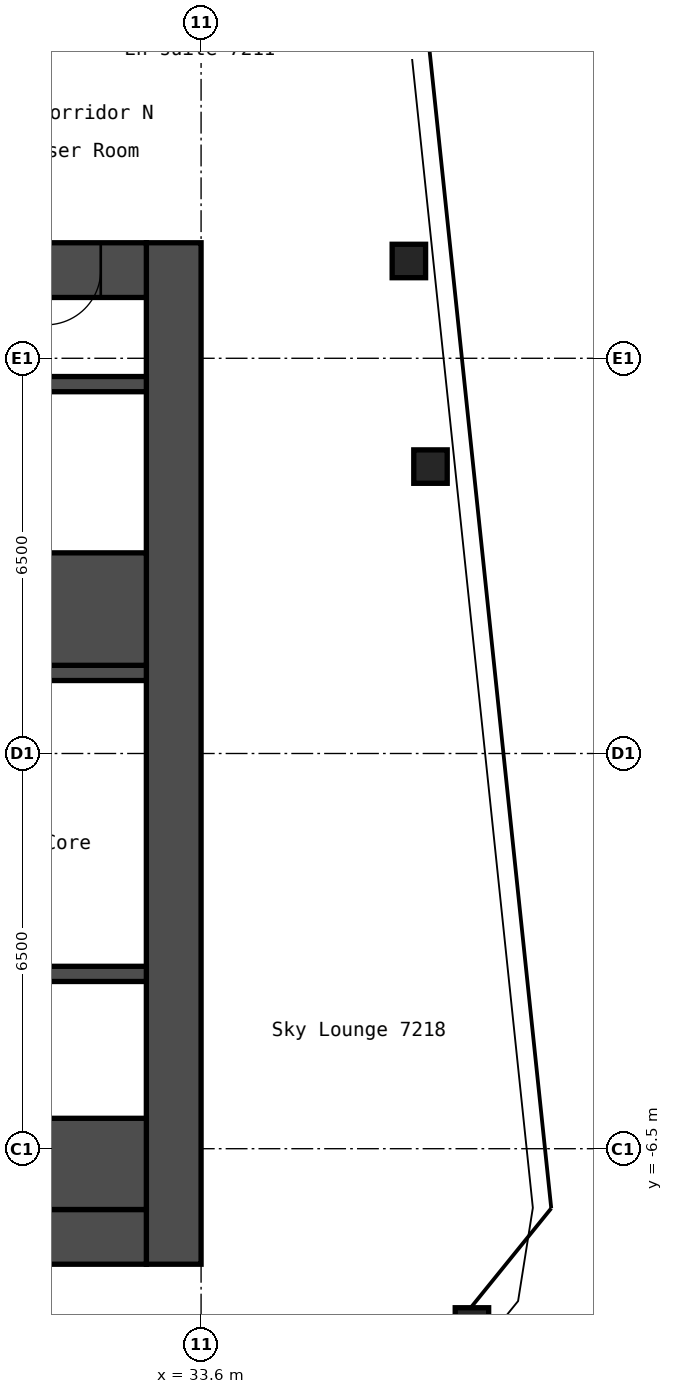
"""IFC4 building model, lengths in metres.
Left out: names, types, materials, properties, quantities, classifications, styles, units other than length and angle.
Written with IfcOpenShell. Run it as: python <this file> out.ifc"""

import sys

from ifc_helpers import new_model, si_unit, direction, frame, frame_2d, origin, origin_2d, place, context, subcontext, project, spatial, rectangle, hollow_rectangle, extrude, element, fill, save


model = new_model("IFC4")
c1 = context("Model", 3, precision=1e-05, world=origin(), true_north=direction((0.0, 1.0)))
c2 = subcontext(c1, "Body", "Model", "MODEL_VIEW")
j1 = project(units=[si_unit("LENGTHUNIT", "METRE"), si_unit("PLANEANGLEUNIT", "RADIAN")], contexts=[c1])
p1 = place(None, origin())
s1 = spatial("IfcSite", under=j1, at=p1, CompositionType="ELEMENT")
p2 = place(p1, origin())
s2 = spatial("IfcBuilding", under=s1, at=p2, CompositionType="ELEMENT")
p3 = place(p2, frame((0.0, 0.0, 255.0)))
s3 = spatial("IfcBuildingStorey", under=s2, at=p3, CompositionType="ELEMENT", Elevation=255.0)
for number, where, z_axis, x_axis in (
    (1, (38.054, -9.39, 0.0), (0.0, 0.0, 1.0), (1.0, 0.0, 0.0)),
    (2, (37.373, 4.719, 0.0), (0.0, 0.0, 1.0), (1.0, 0.0, 0.0)),
    (3, (37.017, 8.1, 0.0), (0.0, 0.0, 1.0), (1.0, 0.0, 0.0)),
):
    element("IfcColumn", number, at=place(p3, frame(where, z_axis=z_axis, x_axis=x_axis)), inside=s3, PredefinedType="COLUMN", context=c2, shape_type="SweptSolid", body=[
        extrude(hollow_rectangle(XDim=0.55, YDim=0.55, WallThickness=0.022, InnerFilletRadius=0.033, OuterFilletRadius=0.055, at=origin_2d()), origin(), (0.0, 0.0, 1.0), 2.75),
    ])
p4 = place(p3, frame((33.15, -8.4, 0.0), z_axis=(0.0, 0.0, 1.0), x_axis=(0.0, 1.0, 0.0)))
e4 = element("IfcWall", 4, at=p4, inside=s3, PredefinedType="SHEAR", context=c2, shape_type="SweptSolid", body=[
    extrude(rectangle(XDim=16.8, YDim=0.9, at=frame_2d((8.4, 0.0))), origin(), (0.0, 0.0, 1.0), 2.75),
])
p5 = place(p3, frame((17.7, 7.95, 0.0), z_axis=(0.0, 0.0, 1.0), x_axis=(1.0, 0.0, 0.0)))
e5 = element("IfcWall", 5, at=p5, inside=s3, PredefinedType="SHEAR", context=c2, shape_type="SweptSolid", body=[
    extrude(rectangle(XDim=15.0, YDim=0.9, at=frame_2d((7.5, 0.0))), origin(), (0.0, 0.0, 1.0), 2.75),
])
p6 = place(p5, frame((10.4, 0.0, 0.0)))
e6 = element("IfcOpeningElement", 6, at=p6, cuts=e5, PredefinedType="OPENING", context=c2, shape_type="SweptSolid", body=[
    extrude(rectangle(XDim=1.2, YDim=2.1, at=frame_2d((0.6, 1.05))), frame((0.0, 0.46, 0.0), z_axis=(0.0, -1.0, 0.0), x_axis=(1.0, 0.0, 0.0)), (0.0, 0.0, 1.0), 0.92),
])
p7 = place(p5, frame((13.35, 0.0, 0.0)))
e7 = element("IfcOpeningElement", 7, at=p7, cuts=e5, PredefinedType="OPENING", context=c2, shape_type="SweptSolid", body=[
    extrude(rectangle(XDim=0.9, YDim=2.1, at=frame_2d((0.45, 1.05))), frame((0.0, 0.46, 0.0), z_axis=(0.0, -1.0, 0.0), x_axis=(1.0, 0.0, 0.0)), (0.0, 0.0, 1.0), 0.92),
])
p8 = place(p3, frame((17.7, -7.95, 0.0), z_axis=(0.0, 0.0, 1.0), x_axis=(1.0, 0.0, 0.0)))
e8 = element("IfcWall", 8, at=p8, inside=s3, PredefinedType="SHEAR", context=c2, shape_type="SweptSolid", body=[
    extrude(rectangle(XDim=15.0, YDim=0.9, at=frame_2d((7.5, 0.0))), origin(), (0.0, 0.0, 1.0), 2.75),
])
p9 = place(p8, frame((2.55, 0.0, 0.0)))
e9 = element("IfcOpeningElement", 9, at=p9, cuts=e8, PredefinedType="OPENING", context=c2, shape_type="SweptSolid", body=[
    extrude(rectangle(XDim=1.0, YDim=2.1, at=frame_2d((0.5, 1.05))), frame((0.0, 0.46, 0.0), z_axis=(0.0, -1.0, 0.0), x_axis=(1.0, 0.0, 0.0)), (0.0, 0.0, 1.0), 0.92),
])
p10 = place(p3, frame((27.65, 1.325, 0.0), z_axis=(0.0, 0.0, 1.0), x_axis=(1.0, 0.0, 0.0)))
e10 = element("IfcWall", 10, at=p10, inside=s3, PredefinedType="SHEAR", context=c2, shape_type="SweptSolid", body=[
    extrude(rectangle(XDim=5.05, YDim=0.25, at=frame_2d((2.525, 0.0))), origin(), (0.0, 0.0, 1.0), 2.75),
])
p11 = place(p10, frame((0.55, 0.0, 0.0)))
e11 = element("IfcOpeningElement", 11, at=p11, cuts=e10, PredefinedType="OPENING", context=c2, shape_type="SweptSolid", body=[
    extrude(rectangle(XDim=1.2, YDim=2.1, at=frame_2d((0.6, 1.05))), frame((0.0, 0.135, 0.0), z_axis=(0.0, -1.0, 0.0), x_axis=(1.0, 0.0, 0.0)), (0.0, 0.0, 1.0), 0.27),
])
p12 = place(p3, frame((30.3, 2.375, 0.0), z_axis=(0.0, 0.0, 1.0), x_axis=(1.0, 0.0, 0.0)))
e12 = element("IfcWall", 12, at=p12, inside=s3, PredefinedType="SHEAR", context=c2, shape_type="SweptSolid", body=[
    extrude(rectangle(XDim=2.4, YDim=1.85, at=frame_2d((1.2, 0.0))), origin(), (0.0, 0.0, 1.0), 2.75),
])
p13 = place(p3, frame((30.3, 6.075, 0.0), z_axis=(0.0, 0.0, 1.0), x_axis=(1.0, 0.0, 0.0)))
e13 = element("IfcWall", 13, at=p13, inside=s3, PredefinedType="SHEAR", context=c2, shape_type="SweptSolid", body=[
    extrude(rectangle(XDim=2.4, YDim=0.25, at=frame_2d((1.2, 0.0))), origin(), (0.0, 0.0, 1.0), 2.75),
])
p14 = place(p3, frame((28.15, -3.625, 0.0), z_axis=(0.0, 0.0, 1.0), x_axis=(1.0, 0.0, 0.0)))
e14 = element("IfcWall", 14, at=p14, inside=s3, PredefinedType="SHEAR", context=c2, shape_type="SweptSolid", body=[
    extrude(rectangle(XDim=4.55, YDim=0.25, at=frame_2d((2.275, 0.0))), origin(), (0.0, 0.0, 1.0), 2.75),
])
p15 = place(p3, frame((28.15, -6.75, 0.0), z_axis=(0.0, 0.0, 1.0), x_axis=(1.0, 0.0, 0.0)))
e15 = element("IfcWall", 15, at=p15, inside=s3, PredefinedType="SHEAR", context=c2, shape_type="SweptSolid", body=[
    extrude(rectangle(XDim=4.55, YDim=1.5, at=frame_2d((2.275, 0.0))), origin(), (0.0, 0.0, 1.0), 2.75),
])
p16 = place(p3, frame((16.048, 10.533, 0.0), z_axis=(0.0, 0.0, 1.0), x_axis=(0.994522460242, 0.104523088709, 0.0)))
e16 = element("IfcWall", 16, at=p16, inside=s3, PredefinedType="PARTITIONING", context=c2, shape_type="SweptSolid", body=[
    extrude(rectangle(XDim=21.3, YDim=0.2, at=frame_2d((10.65, 0.0))), origin(), (0.0, 0.0, 1.0), 2.75),
])
p17 = place(p16, frame((3.4, 0.0, 0.0)))
e17 = element("IfcOpeningElement", 17, at=p17, cuts=e16, PredefinedType="OPENING", context=c2, shape_type="SweptSolid", body=[
    extrude(rectangle(XDim=1.6, YDim=2.1, at=frame_2d((0.8, 1.05))), frame((0.0, 0.11, 0.0), z_axis=(0.0, -1.0, 0.0), x_axis=(1.0, 0.0, 0.0)), (0.0, 0.0, 1.0), 0.22),
])
p18 = place(p16, frame((11.8, 0.0, 0.0)))
e18 = element("IfcOpeningElement", 18, at=p18, cuts=e16, PredefinedType="OPENING", context=c2, shape_type="SweptSolid", body=[
    extrude(rectangle(XDim=1.6, YDim=2.1, at=frame_2d((0.8, 1.05))), frame((0.0, 0.11, 0.0), z_axis=(0.0, -1.0, 0.0), x_axis=(1.0, 0.0, 0.0)), (0.0, 0.0, 1.0), 0.22),
])
p19 = place(p16, frame((19.65, 0.0, 0.0)))
e19 = element("IfcOpeningElement", 19, at=p19, cuts=e16, PredefinedType="OPENING", context=c2, shape_type="SweptSolid", body=[
    extrude(rectangle(XDim=1.0, YDim=2.1, at=frame_2d((0.5, 1.05))), frame((0.0, 0.11, 0.0), z_axis=(0.0, -1.0, 0.0), x_axis=(1.0, 0.0, 0.0)), (0.0, 0.0, 1.0), 0.22),
])
p20 = place(p7, origin())
e20 = element("IfcDoor", 20, at=p20, inside=s3, OperationType="SINGLE_SWING_LEFT", PredefinedType="DOOR", context=c2, shape_type="SweptSolid", body=[
    extrude(rectangle(XDim=0.9, YDim=2.1, at=frame_2d((0.45, 1.05))), frame((0.0, 0.025, 0.0), z_axis=(0.0, -1.0, 0.0), x_axis=(1.0, 0.0, 0.0)), (0.0, 0.0, 1.0), 0.05),
])
fill(e7, e20)
save(model, sys.argv[1])
